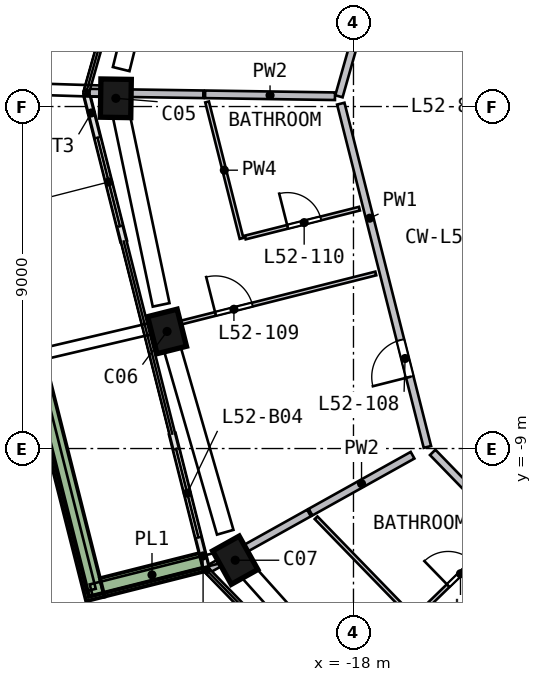
"""IFC4 building model, lengths in metres.
Left out: names, types, materials, properties, quantities, classifications, styles, units other than length and angle.
Written with IfcOpenShell. Run it as: python <this file> out.ifc"""

import sys

from ifc_helpers import new_model, si_unit, direction, frame, frame_2d, origin, origin_2d, place, context, subcontext, project, spatial, rectangle, extrude, element, fill, save


model = new_model("IFC4")
c1 = context("Model", 3, precision=1e-05, world=origin(), true_north=direction((0.0, 1.0)))
c2 = subcontext(c1, "Body", "Model", "MODEL_VIEW")
j1 = project(units=[si_unit("LENGTHUNIT", "METRE"), si_unit("PLANEANGLEUNIT", "RADIAN")], contexts=[c1])
p1 = place(None, origin())
s1 = spatial("IfcSite", under=j1, at=p1, CompositionType="ELEMENT")
p2 = place(p1, origin())
s2 = spatial("IfcBuilding", under=s1, at=p2, CompositionType="ELEMENT")
p3 = place(p2, frame((0.0, 0.0, 212.5)))
s3 = spatial("IfcBuildingStorey", under=s2, at=p3, CompositionType="ELEMENT", Elevation=212.5)
p4 = place(p3, frame((-24.252, 0.356, 0.0), z_axis=(-0.000727532, -0.115354293, 0.993324145), x_axis=(0.014697649, 0.993215879, 0.115352485)))
e1 = element("IfcColumn", 1, at=p4, inside=s3, PredefinedType="COLUMN", context=c2, shape_type="SweptSolid", body=[
    extrude(rectangle(XDim=1.0, YDim=0.8, at=origin_2d()), origin(), (0.0, 0.0, 1.0), 3.02),
])
p5 = place(p3, frame((-22.939, -5.788, 0.0), z_axis=(0.028463973, -0.108842351, 0.99365142), x_axis=(0.243234613, -0.96342149, -0.112498691)))
e2 = element("IfcColumn", 2, at=p5, inside=s3, PredefinedType="COLUMN", context=c2, shape_type="SweptSolid", body=[
    extrude(rectangle(XDim=1.0, YDim=0.8, at=origin_2d()), origin(), (0.0, 0.0, 1.0), 3.019),
])
p6 = place(p3, frame((-21.181, -11.818, 0.0), z_axis=(0.057070939, -0.100237911, 0.993325359), x_axis=(-0.484131141, 0.867359933, 0.115342033)))
e3 = element("IfcColumn", 3, at=p6, inside=s3, PredefinedType="COLUMN", context=c2, shape_type="SweptSolid", body=[
    extrude(rectangle(XDim=1.0, YDim=0.8, at=origin_2d()), origin(), (0.0, 0.0, 1.0), 3.02),
])
p7 = place(p3, frame((-25.014, 0.289, 0.0), z_axis=(0.0, 0.0, 1.0), x_axis=(0.244646014, -0.969612463, 0.0)))
e4 = element("IfcWall", 4, at=p7, inside=s3, PredefinedType="SOLIDWALL", context=c2, shape_type="SweptSolid", body=[
    extrude(rectangle(XDim=3.946, YDim=0.15, at=frame_2d((1.973, 0.0))), origin(), (0.0, 0.0, 1.0), 2.935),
])
p8 = place(p7, frame((1.146, 0.0, 0.0)))
e5 = element("IfcOpeningElement", 5, at=p8, cuts=e4, PredefinedType="OPENING", context=c2, shape_type="SweptSolid", body=[
    extrude(rectangle(XDim=2.4, YDim=2.4, at=frame_2d((1.2, 1.2))), frame((0.0, 0.085, 0.0), z_axis=(0.0, -1.0, 0.0), x_axis=(1.0, 0.0, 0.0)), (0.0, 0.0, 1.0), 0.17),
])
p9 = place(p3, frame((-22.766, -8.622, 0.0), z_axis=(0.0, 0.0, 1.0), x_axis=(0.244636305, -0.969614912, 0.0)))
e6 = element("IfcWall", 6, at=p9, inside=s3, PredefinedType="SOLIDWALL", context=c2, shape_type="SweptSolid", body=[
    extrude(rectangle(XDim=3.609, YDim=0.15, at=frame_2d((1.804, 0.0))), origin(), (0.0, 0.0, 1.0), 2.935),
])
p10 = place(p9, frame((0.4, 0.0, 0.0)))
e7 = element("IfcOpeningElement", 7, at=p10, cuts=e6, PredefinedType="OPENING", context=c2, shape_type="SweptSolid", body=[
    extrude(rectangle(XDim=2.4, YDim=2.4, at=frame_2d((1.2, 1.2))), frame((0.0, 0.085, 0.0), z_axis=(0.0, -1.0, 0.0), x_axis=(1.0, 0.0, 0.0)), (0.0, 0.0, 1.0), 0.17),
])
p11 = place(p3, frame((-24.537, 13.199, 0.0), z_axis=(0.0, 0.0, 1.0), x_axis=(-0.272950348, -0.962028122, 0.0)))
e8 = element("IfcWall", 8, at=p11, inside=s3, PredefinedType="SOLIDWALL", context=c2, shape_type="SweptSolid", body=[
    extrude(rectangle(XDim=13.224, YDim=0.5, at=frame_2d((6.612, 0.0))), origin(), (0.0, 0.0, 1.0), 0.7),
])
p12 = place(p3, frame((-28.149, 0.348, 0.0), z_axis=(0.0, 0.0, 1.0), x_axis=(0.244632202, -0.969615948, 0.0)))
e9 = element("IfcWall", 9, at=p12, inside=s3, PredefinedType="SOLIDWALL", context=c2, shape_type="SweptSolid", body=[
    extrude(rectangle(XDim=13.723, YDim=0.5, at=frame_2d((6.862, 0.0))), origin(), (0.0, 0.0, 1.0), 0.7),
])
p13 = place(p3, frame((-24.61, -12.655, 0.0), z_axis=(0.0, 0.0, 1.0), x_axis=(0.969602701, 0.244684701, 0.0)))
e10 = element("IfcWall", 10, at=p13, inside=s3, PredefinedType="SOLIDWALL", context=c2, shape_type="SweptSolid", body=[
    extrude(rectangle(XDim=2.699, YDim=0.5, at=frame_2d((1.35, 0.0))), origin(), (0.0, 0.0, 1.0), 0.7),
])
p14 = place(p3, frame((-16.055, -8.958, 0.0), z_axis=(0.0, 0.0, 1.0), x_axis=(-0.244643731, 0.969613039, 0.0)))
e11 = element("IfcWall", 11, at=p14, inside=s3, PredefinedType="SOLIDWALL", context=c2, shape_type="SweptSolid", body=[
    extrude(rectangle(XDim=9.317, YDim=0.2, at=frame_2d((4.658, 0.0))), origin(), (0.0, 0.0, 1.0), 3.0),
])
p15 = place(p14, frame((1.9, 0.0, 0.0)))
e12 = element("IfcOpeningElement", 12, at=p15, cuts=e11, PredefinedType="OPENING", context=c2, shape_type="SweptSolid", body=[
    extrude(rectangle(XDim=1.0, YDim=2.1, at=frame_2d((0.5, 1.05))), frame((0.0, 0.11, 0.0), z_axis=(0.0, -1.0, 0.0), x_axis=(1.0, 0.0, 0.0)), (0.0, 0.0, 1.0), 0.22),
])
p16 = place(p3, frame((-18.383, 0.27, 0.0), z_axis=(0.0, 0.0, 1.0), x_axis=(0.272958768, 0.962025733, 0.0)))
e13 = element("IfcWall", 13, at=p16, inside=s3, PredefinedType="SOLIDWALL", context=c2, shape_type="SweptSolid", body=[
    extrude(rectangle(XDim=9.517, YDim=0.2, at=frame_2d((4.758, 0.0))), origin(), (0.0, 0.0, 1.0), 3.0),
])
p17 = place(p16, frame((1.9, 0.0, 0.0)))
e14 = element("IfcOpeningElement", 14, at=p17, cuts=e13, PredefinedType="OPENING", context=c2, shape_type="SweptSolid", body=[
    extrude(rectangle(XDim=1.0, YDim=2.1, at=frame_2d((0.5, 1.05))), frame((0.0, 0.11, 0.0), z_axis=(0.0, -1.0, 0.0), x_axis=(1.0, 0.0, 0.0)), (0.0, 0.0, 1.0), 0.22),
])
p18 = place(p3, frame((-9.425, -15.785, 0.0), z_axis=(0.0, 0.0, 1.0), x_axis=(-0.696666645, 0.717395, 0.0)))
e15 = element("IfcWall", 15, at=p18, inside=s3, PredefinedType="SOLIDWALL", context=c2, shape_type="SweptSolid", body=[
    extrude(rectangle(XDim=9.316, YDim=0.2, at=frame_2d((4.658, 0.0))), origin(), (0.0, 0.0, 1.0), 3.0),
])
p19 = place(p18, frame((5.15, 0.0, 0.0)))
e16 = element("IfcOpeningElement", 16, at=p19, cuts=e15, PredefinedType="OPENING", context=c2, shape_type="SweptSolid", body=[
    extrude(rectangle(XDim=1.0, YDim=2.1, at=frame_2d((0.5, 1.05))), frame((0.0, 0.11, 0.0), z_axis=(0.0, -1.0, 0.0), x_axis=(1.0, 0.0, 0.0)), (0.0, 0.0, 1.0), 0.22),
])
p20 = place(p3, frame((-21.95, 0.322, 0.0), z_axis=(0.0, 0.0, 1.0), x_axis=(-0.999892341, 0.014673303, 0.0)))
e17 = element("IfcWall", 17, at=p20, inside=s3, PredefinedType="SOLIDWALL", context=c2, shape_type="SweptSolid", body=[
    extrude(rectangle(XDim=3.011, YDim=0.2, at=frame_2d((1.506, 0.0))), origin(), (0.0, 0.0, 1.0), 3.0),
])
p21 = place(p3, frame((-19.17, -10.696, 0.0), z_axis=(0.0, 0.0, 1.0), x_axis=(-0.873241825, -0.487287097, 0.0)))
e18 = element("IfcWall", 18, at=p21, inside=s3, PredefinedType="SOLIDWALL", context=c2, shape_type="SweptSolid", body=[
    extrude(rectangle(XDim=3.012, YDim=0.2, at=frame_2d((1.506, 0.0))), origin(), (0.0, 0.0, 1.0), 3.0),
])
p22 = place(p3, frame((-18.486, 0.271, 0.0), z_axis=(0.0, 0.0, 1.0), x_axis=(-0.999891762, 0.014712693, 0.0)))
e19 = element("IfcWall", 19, at=p22, inside=s3, PredefinedType="SOLIDWALL", context=c2, shape_type="SweptSolid", body=[
    extrude(rectangle(XDim=3.418, YDim=0.2, at=frame_2d((1.709, 0.0))), origin(), (0.0, 0.0, 1.0), 3.0),
])
p23 = place(p3, frame((-16.445, -9.176, 0.0), z_axis=(0.0, 0.0, 1.0), x_axis=(-0.873245633, -0.487280274, 0.0)))
e20 = element("IfcWall", 20, at=p23, inside=s3, PredefinedType="SOLIDWALL", context=c2, shape_type="SweptSolid", body=[
    extrude(rectangle(XDim=3.075, YDim=0.2, at=frame_2d((1.537, 0.0))), origin(), (0.0, 0.0, 1.0), 3.0),
])
p24 = place(p3, frame((-21.852, 0.12, 0.0), z_axis=(0.0, 0.0, 1.0), x_axis=(0.244659687, -0.969609013, 0.0)))
e21 = element("IfcWall", 21, at=p24, inside=s3, PredefinedType="PARTITIONING", context=c2, shape_type="SweptSolid", body=[
    extrude(rectangle(XDim=3.704, YDim=0.1, at=frame_2d((1.852, 0.0))), origin(), (0.0, 0.0, 1.0), 3.0),
])
p25 = place(p3, frame((-23.376, -5.898, 0.0), z_axis=(0.0, 0.0, 1.0), x_axis=(0.969619522, 0.244618035, 0.0)))
e22 = element("IfcWall", 22, at=p25, inside=s3, PredefinedType="PARTITIONING", context=c2, shape_type="SweptSolid", body=[
    extrude(rectangle(XDim=6.15, YDim=0.1, at=frame_2d((3.075, 0.0))), origin(), (0.0, 0.0, 1.0), 3.0),
])
p26 = place(p25, frame((1.8, 0.0, 0.0)))
e23 = element("IfcOpeningElement", 23, at=p26, cuts=e22, PredefinedType="OPENING", context=c2, shape_type="SweptSolid", body=[
    extrude(rectangle(XDim=1.0, YDim=2.1, at=frame_2d((0.5, 1.05))), frame((0.0, 0.06, 0.0), z_axis=(0.0, -1.0, 0.0), x_axis=(1.0, 0.0, 0.0)), (0.0, 0.0, 1.0), 0.12),
])
p27 = place(p3, frame((-20.849, -3.447, 0.0), z_axis=(0.0, 0.0, 1.0), x_axis=(0.969621429, 0.244610474, 0.0)))
e24 = element("IfcWall", 24, at=p27, inside=s3, PredefinedType="PARTITIONING", context=c2, shape_type="SweptSolid", body=[
    extrude(rectangle(XDim=3.1, YDim=0.1, at=frame_2d((1.55, 0.0))), origin(), (0.0, 0.0, 1.0), 3.0),
])
p28 = place(p27, frame((1.15, 0.0, 0.0)))
e25 = element("IfcOpeningElement", 25, at=p28, cuts=e24, PredefinedType="OPENING", context=c2, shape_type="SweptSolid", body=[
    extrude(rectangle(XDim=0.9, YDim=2.1, at=frame_2d((0.45, 1.05))), frame((0.0, 0.06, 0.0), z_axis=(0.0, -1.0, 0.0), x_axis=(1.0, 0.0, 0.0)), (0.0, 0.0, 1.0), 0.12),
])
p29 = place(p3, frame((-16.404, -13.479, 0.0), z_axis=(0.0, 0.0, 1.0), x_axis=(-0.696682976, 0.71737914, 0.0)))
e26 = element("IfcWall", 26, at=p29, inside=s3, PredefinedType="PARTITIONING", context=c2, shape_type="SweptSolid", body=[
    extrude(rectangle(XDim=3.704, YDim=0.1, at=frame_2d((1.852, 0.0))), origin(), (0.0, 0.0, 1.0), 3.0),
])
p30 = place(p3, frame((-16.332, -13.409, 0.0), z_axis=(0.0, 0.0, 1.0), x_axis=(0.717425556, 0.696635178, 0.0)))
e27 = element("IfcWall", 27, at=p30, inside=s3, PredefinedType="PARTITIONING", context=c2, shape_type="SweptSolid", body=[
    extrude(rectangle(XDim=3.1, YDim=0.1, at=frame_2d((1.55, 0.0))), origin(), (0.0, 0.0, 1.0), 3.0),
])
p31 = place(p30, frame((1.15, 0.0, 0.0)))
e28 = element("IfcOpeningElement", 28, at=p31, cuts=e27, PredefinedType="OPENING", context=c2, shape_type="SweptSolid", body=[
    extrude(rectangle(XDim=0.9, YDim=2.1, at=frame_2d((0.45, 1.05))), frame((0.0, 0.06, 0.0), z_axis=(0.0, -1.0, 0.0), x_axis=(1.0, 0.0, 0.0)), (0.0, 0.0, 1.0), 0.12),
])
p32 = place(p8, origin())
e29 = element("IfcDoor", 29, at=p32, inside=s3, OperationType="SLIDING_TO_LEFT", PredefinedType="DOOR", context=c2, shape_type="SweptSolid", body=[
    extrude(rectangle(XDim=2.4, YDim=2.4, at=frame_2d((1.2, 1.2))), frame((0.0, 0.025, 0.0), z_axis=(0.0, -1.0, 0.0), x_axis=(1.0, 0.0, 0.0)), (0.0, 0.0, 1.0), 0.05),
])
fill(e5, e29)
p33 = place(p10, origin())
e30 = element("IfcDoor", 30, at=p33, inside=s3, OperationType="SLIDING_TO_RIGHT", PredefinedType="DOOR", context=c2, shape_type="SweptSolid", body=[
    extrude(rectangle(XDim=2.4, YDim=2.4, at=frame_2d((1.2, 1.2))), frame((0.0, 0.025, 0.0), z_axis=(0.0, -1.0, 0.0), x_axis=(1.0, 0.0, 0.0)), (0.0, 0.0, 1.0), 0.05),
])
fill(e7, e30)
p34 = place(p15, origin())
e31 = element("IfcDoor", 31, at=p34, inside=s3, OperationType="SINGLE_SWING_LEFT", PredefinedType="DOOR", context=c2, shape_type="SweptSolid", body=[
    extrude(rectangle(XDim=1.0, YDim=2.1, at=frame_2d((0.5, 1.05))), frame((0.0, 0.025, 0.0), z_axis=(0.0, -1.0, 0.0), x_axis=(1.0, 0.0, 0.0)), (0.0, 0.0, 1.0), 0.05),
])
fill(e12, e31)
p35 = place(p26, origin())
e32 = element("IfcDoor", 32, at=p35, inside=s3, OperationType="SINGLE_SWING_LEFT", PredefinedType="DOOR", context=c2, shape_type="SweptSolid", body=[
    extrude(rectangle(XDim=1.0, YDim=2.1, at=frame_2d((0.5, 1.05))), frame((0.0, 0.025, 0.0), z_axis=(0.0, -1.0, 0.0), x_axis=(1.0, 0.0, 0.0)), (0.0, 0.0, 1.0), 0.05),
])
fill(e23, e32)
p36 = place(p28, origin())
e33 = element("IfcDoor", 33, at=p36, inside=s3, OperationType="SINGLE_SWING_LEFT", PredefinedType="DOOR", context=c2, shape_type="SweptSolid", body=[
    extrude(rectangle(XDim=0.9, YDim=2.1, at=frame_2d((0.45, 1.05))), frame((0.0, 0.025, 0.0), z_axis=(0.0, -1.0, 0.0), x_axis=(1.0, 0.0, 0.0)), (0.0, 0.0, 1.0), 0.05),
])
fill(e25, e33)
p37 = place(p31, origin())
e34 = element("IfcDoor", 34, at=p37, inside=s3, OperationType="SINGLE_SWING_LEFT", PredefinedType="DOOR", context=c2, shape_type="SweptSolid", body=[
    extrude(rectangle(XDim=0.9, YDim=2.1, at=frame_2d((0.45, 1.05))), frame((0.0, 0.025, 0.0), z_axis=(0.0, -1.0, 0.0), x_axis=(1.0, 0.0, 0.0)), (0.0, 0.0, 1.0), 0.05),
])
fill(e28, e34)
save(model, sys.argv[1])
